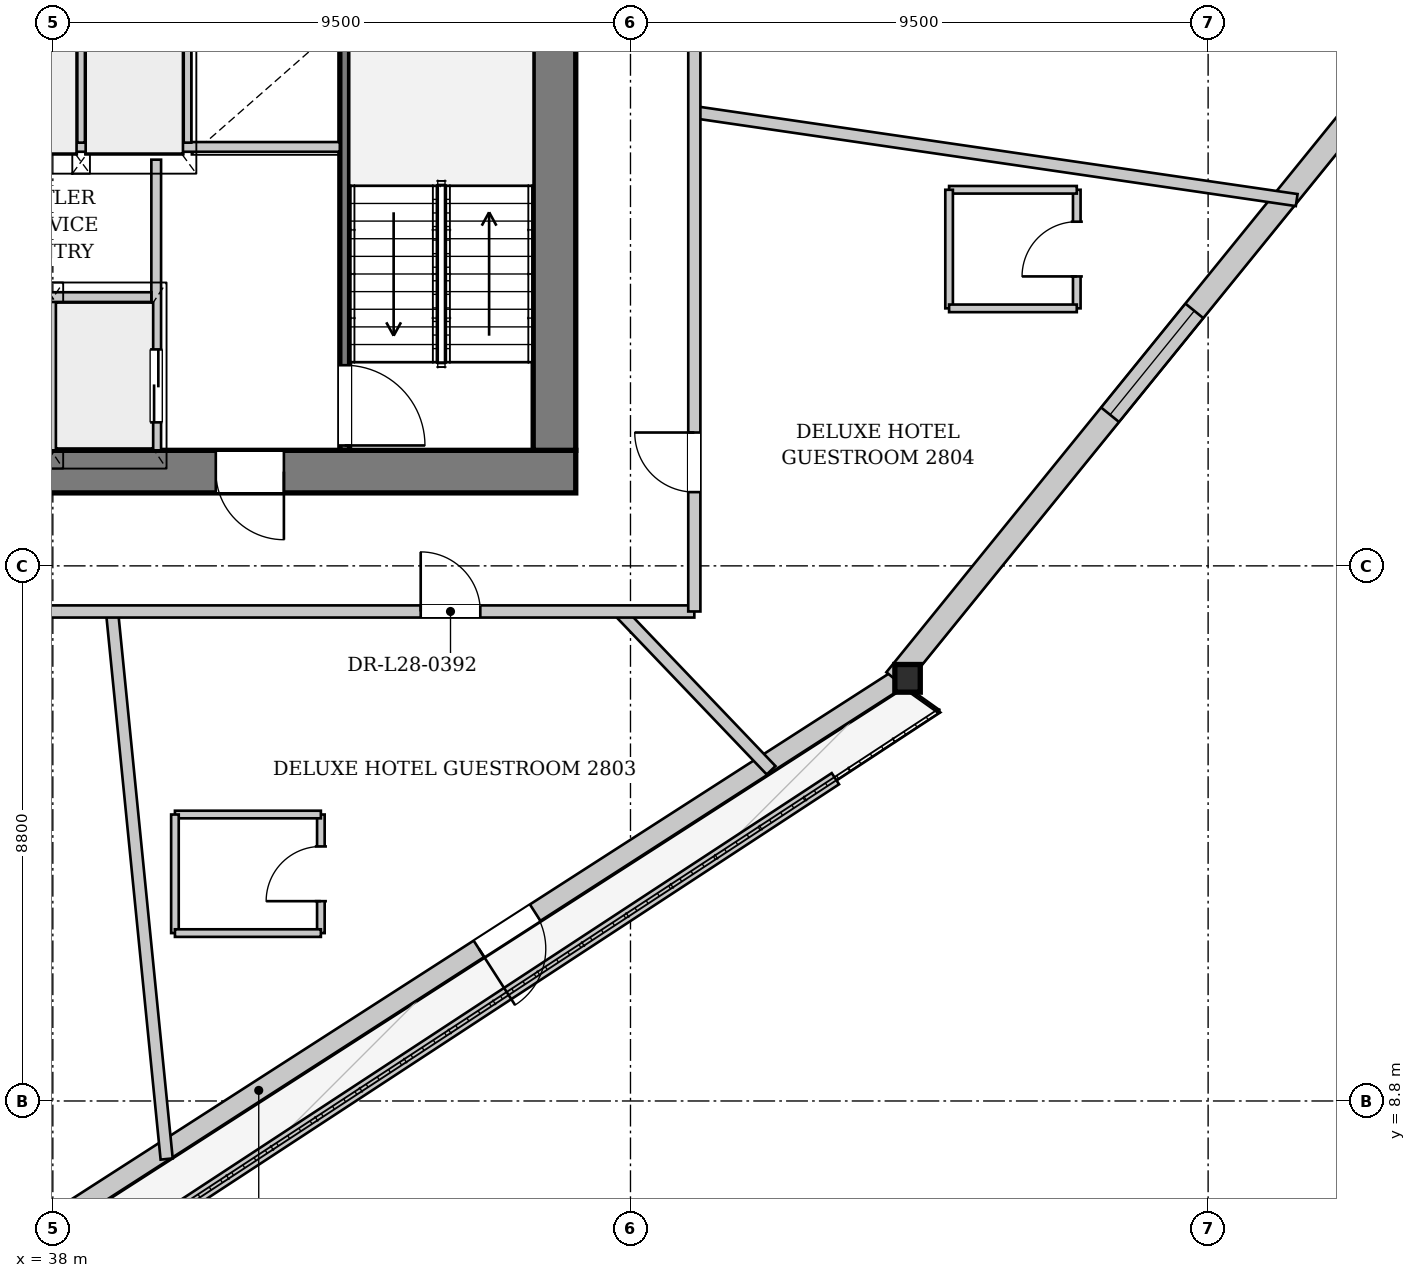
"""IFC4 building model, lengths in metres.
Left out: names, types, materials, properties, quantities, classifications, styles, units other than length and angle.
Written with IfcOpenShell. Run it as: python <this file> out.ifc"""

import sys

from ifc_helpers import new_model, si_unit, direction, frame, frame_2d, origin, origin_2d, place, context, subcontext, project, spatial, rectangle, i_section, extrude, source, transform, mapped, element, fill, save


model = new_model("IFC4")
c1 = context("Model", 3, precision=1e-05, world=origin(), true_north=direction((0.0, 1.0)))
c2 = subcontext(c1, "Body", "Model", "MODEL_VIEW")
j1 = project(units=[si_unit("LENGTHUNIT", "METRE"), si_unit("PLANEANGLEUNIT", "RADIAN")], contexts=[c1])
p1 = place(None, origin())
s1 = spatial("IfcSite", under=j1, at=p1, CompositionType="ELEMENT")
p2 = place(p1, origin())
s2 = spatial("IfcBuilding", under=s1, at=p2, CompositionType="ELEMENT")
p3 = place(p2, frame((0.0, 0.0, 109.25)))
s3 = spatial("IfcBuildingStorey", under=s2, at=p3, CompositionType="ELEMENT", Elevation=109.25)
m1 = source(origin(), c2, "Body", "SweptSolid", [
    extrude(i_section(OverallWidth=0.418, OverallDepth=0.455, WebThickness=0.038, FlangeThickness=0.059, at=origin_2d()), origin(), (0.0, 0.0, 1.0), 3.398),
])
p4 = place(p3, frame((52.003, 15.611, 0.0), z_axis=(0.031540088842, 0.081975492868, 0.996135152158), x_axis=(-0.933303436378, 0.359088701639, 0.0)))
e1 = element("IfcColumn", 1, at=p4, inside=s3, PredefinedType="COLUMN", context=c2, shape_type="MappedRepresentation", body=[
    mapped(m1, transform((0.0, 0.0, 0.0), x_axis=(1.0, 0.0, 0.0), y_axis=(0.0, 1.0, 0.0), z_axis=(0.0, 0.0, 1.0), scale=1.0)),
])
p5 = place(p3, frame((51.917, 15.746, 0.0), z_axis=(0.0, 0.0, 1.0), x_axis=(-0.841105279502, -0.540871434626, 0.0)))
e2 = element("IfcWall", 2, at=p5, inside=s3, PredefinedType="SOLIDWALL", context=c2, shape_type="SweptSolid", body=[
    extrude(rectangle(XDim=23.953, YDim=0.32, at=frame_2d((11.976, 0.0))), origin(), (0.0, 0.0, 1.0), 2.692),
])
p6 = place(p5, frame((7.115, 0.0, 0.0)))
e3 = element("IfcOpeningElement", 3, at=p6, cuts=e2, PredefinedType="OPENING", context=c2, shape_type="SweptSolid", body=[
    extrude(rectangle(XDim=1.1, YDim=2.3, at=frame_2d((0.55, 1.15))), frame((0.0, 0.17, 0.0), z_axis=(0.0, -1.0, 0.0), x_axis=(1.0, 0.0, 0.0)), (0.0, 0.0, 1.0), 0.34),
])
p7 = place(p5, frame((16.825, 0.0, 0.372)))
e4 = element("IfcOpeningElement", 4, at=p7, cuts=e2, PredefinedType="OPENING", context=c2, shape_type="SweptSolid", body=[
    extrude(rectangle(XDim=1.8, YDim=2.2, at=frame_2d((0.9, 1.1))), frame((0.0, 0.17, 0.0), z_axis=(0.0, -1.0, 0.0), x_axis=(1.0, 0.0, 0.0)), (0.0, 0.0, 1.0), 0.34),
])
p8 = place(p3, frame((66.944, 34.334, 0.0), z_axis=(0.0, 0.0, 1.0), x_axis=(-0.629923947576, -0.776656822715, 0.0)))
e5 = element("IfcWall", 5, at=p8, inside=s3, PredefinedType="SOLIDWALL", context=c2, shape_type="SweptSolid", body=[
    extrude(rectangle(XDim=23.953, YDim=0.38, at=frame_2d((11.976, 0.0))), origin(), (0.0, 0.0, 1.0), 2.692),
])
p9 = place(p8, frame((5.607, 0.0, 0.322)))
e6 = element("IfcOpeningElement", 6, at=p9, cuts=e5, PredefinedType="OPENING", context=c2, shape_type="SweptSolid", body=[
    extrude(rectangle(XDim=2.2, YDim=2.25, at=frame_2d((1.1, 1.125))), frame((0.0, 0.2, 0.0), z_axis=(0.0, -1.0, 0.0), x_axis=(1.0, 0.0, 0.0)), (0.0, 0.0, 1.0), 0.4),
])
p10 = place(p8, frame((16.146, 0.0, 0.322)))
e7 = element("IfcOpeningElement", 7, at=p10, cuts=e5, PredefinedType="OPENING", context=c2, shape_type="SweptSolid", body=[
    extrude(rectangle(XDim=2.2, YDim=2.25, at=frame_2d((1.1, 1.125))), frame((0.0, 0.2, 0.0), z_axis=(0.0, -1.0, 0.0), x_axis=(1.0, 0.0, 0.0)), (0.0, 0.0, 1.0), 0.4),
])
p11 = place(p3, frame((33.07, 2.433, 0.0), z_axis=(0.0, 0.0, 1.0), x_axis=(0.836347057306, 0.548200328106, 0.0)))
e8 = element("IfcWall", 8, at=p11, inside=s3, PredefinedType="PARAPET", context=c2, shape_type="SweptSolid", body=[
    extrude(rectangle(XDim=21.283, YDim=0.22, at=frame_2d((10.641, 0.0))), origin(), (0.0, 0.0, 1.0), 0.3),
])
p12 = place(p3, frame((46.6, 19.15, 0.0), z_axis=(0.0, 0.0, 1.0), x_axis=(-1.0, 0.0, 0.0)))
e9 = element("IfcWall", 9, at=p12, inside=s3, PredefinedType="SHEAR", context=c2, shape_type="SweptSolid", body=[
    extrude(rectangle(XDim=17.2, YDim=0.7, at=frame_2d((8.6, 0.0))), origin(), (0.0, 0.0, 1.0), 3.3),
])
p13 = place(p12, frame((4.8, 0.0, 0.0)))
e10 = element("IfcOpeningElement", 10, at=p13, cuts=e9, PredefinedType="OPENING", context=c2, shape_type="SweptSolid", body=[
    extrude(rectangle(XDim=1.12, YDim=2.25, at=frame_2d((0.56, 1.125))), frame((0.0, 0.36, 0.0), z_axis=(0.0, -1.0, 0.0), x_axis=(1.0, 0.0, 0.0)), (0.0, 0.0, 1.0), 0.72),
])
p14 = place(p12, frame((11.3, 0.0, 0.0)))
e11 = element("IfcOpeningElement", 11, at=p14, cuts=e9, PredefinedType="OPENING", context=c2, shape_type="SweptSolid", body=[
    extrude(rectangle(XDim=1.12, YDim=2.25, at=frame_2d((0.56, 1.125))), frame((0.0, 0.36, 0.0), z_axis=(0.0, -1.0, 0.0), x_axis=(1.0, 0.0, 0.0)), (0.0, 0.0, 1.0), 0.72),
])
p15 = place(p3, frame((46.25, 33.7, 0.0), z_axis=(0.0, 0.0, 1.0), x_axis=(0.0, -1.0, 0.0)))
e12 = element("IfcWall", 12, at=p15, inside=s3, PredefinedType="SHEAR", context=c2, shape_type="SweptSolid", body=[
    extrude(rectangle(XDim=14.2, YDim=0.7, at=frame_2d((7.1, 0.0))), origin(), (0.0, 0.0, 1.0), 3.3),
])
p16 = place(p15, frame((5.18, 0.0, 0.0)))
e13 = element("IfcOpeningElement", 13, at=p16, cuts=e12, PredefinedType="OPENING", context=c2, shape_type="SweptSolid", body=[
    extrude(rectangle(XDim=1.6, YDim=2.2, at=frame_2d((0.8, 1.1))), frame((0.0, 0.36, 0.0), z_axis=(0.0, -1.0, 0.0), x_axis=(1.0, 0.0, 0.0)), (0.0, 0.0, 1.0), 0.72),
])
p17 = place(p3, frame((42.8, 26.96, 0.0), z_axis=(0.0, 0.0, 1.0), x_axis=(0.0, -1.0, 0.0)))
e14 = element("IfcWall", 14, at=p17, inside=s3, PredefinedType="PARTITIONING", context=c2, shape_type="SweptSolid", body=[
    extrude(rectangle(XDim=7.46, YDim=0.16, at=frame_2d((3.73, 0.0))), origin(), (0.0, 0.0, 1.0), 3.3),
])
p18 = place(p17, frame((6.06, 0.0, 0.0)))
e15 = element("IfcOpeningElement", 15, at=p18, cuts=e14, PredefinedType="OPENING", context=c2, shape_type="SweptSolid", body=[
    extrude(rectangle(XDim=1.32, YDim=2.2, at=frame_2d((0.66, 1.1))), frame((0.0, 0.09, 0.0), z_axis=(0.0, -1.0, 0.0), x_axis=(1.0, 0.0, 0.0)), (0.0, 0.0, 1.0), 0.18),
])
p19 = place(p3, frame((39.7, 24.28, 0.0), z_axis=(0.0, 0.0, 1.0), x_axis=(0.0, -1.0, 0.0)))
e16 = element("IfcWall", 16, at=p19, inside=s3, PredefinedType="PARTITIONING", context=c2, shape_type="SweptSolid", body=[
    extrude(rectangle(XDim=4.78, YDim=0.16, at=frame_2d((2.39, 0.0))), origin(), (0.0, 0.0, 1.0), 3.3),
])
p20 = place(p19, frame((3.12, 0.0, 0.0)))
e17 = element("IfcOpeningElement", 17, at=p20, cuts=e16, PredefinedType="OPENING", context=c2, shape_type="SweptSolid", body=[
    extrude(rectangle(XDim=1.2, YDim=2.2, at=frame_2d((0.6, 1.1))), frame((0.0, 0.09, 0.0), z_axis=(0.0, -1.0, 0.0), x_axis=(1.0, 0.0, 0.0)), (0.0, 0.0, 1.0), 0.18),
])
p21 = place(p3, frame((38.0, 19.5, 0.0), z_axis=(0.0, 0.0, 1.0), x_axis=(0.0, 1.0, 0.0)))
e18 = element("IfcWall", 18, at=p21, inside=s3, PredefinedType="PARTITIONING", context=c2, shape_type="SweptSolid", body=[
    extrude(rectangle(XDim=2.46, YDim=0.125, at=frame_2d((1.23, 0.0))), origin(), (0.0, 0.0, 1.0), 3.3),
])
p22 = place(p3, frame((36.38, 22.02, 0.0), z_axis=(0.0, 0.0, 1.0), x_axis=(1.0, 0.0, 0.0)))
e19 = element("IfcWall", 19, at=p22, inside=s3, PredefinedType="PARTITIONING", context=c2, shape_type="SweptSolid", body=[
    extrude(rectangle(XDim=3.24, YDim=0.16, at=frame_2d((1.62, 0.0))), origin(), (0.0, 0.0, 1.0), 3.3),
])
p23 = place(p3, frame((33.28, 24.49, 0.0), z_axis=(0.0, 0.0, 1.0), x_axis=(1.0, 0.0, 0.0)))
e20 = element("IfcWall", 20, at=p23, inside=s3, PredefinedType="PARTITIONING", context=c2, shape_type="SweptSolid", body=[
    extrude(rectangle(XDim=9.44, YDim=0.16, at=frame_2d((4.72, 0.0))), origin(), (0.0, 0.0, 1.0), 3.3),
])
for number, where, z_axis, x_axis in (
    (21, (38.465, 24.56, 0.0), (0.0, 0.0, 1.0), (0.0, 1.0, 0.0)),
    (22, (40.215, 24.56, 0.0), (0.0, 0.0, 1.0), (0.0, 1.0, 0.0)),
):
    element("IfcWall", number, at=place(p3, frame(where, z_axis=z_axis, x_axis=x_axis)), inside=s3, PredefinedType="PARTITIONING", context=c2, shape_type="SweptSolid", body=[
        extrude(rectangle(XDim=2.31, YDim=0.125, at=frame_2d((1.155, 0.0))), origin(), (0.0, 0.0, 1.0), 3.3),
    ])
p24 = place(p3, frame((38.973, 16.85, 0.0), z_axis=(0.0, 0.0, 1.0), x_axis=(0.099311388346, -0.995056404504, 0.0)))
e23 = element("IfcWall", 23, at=p24, inside=s3, PredefinedType="PARTITIONING", context=c2, shape_type="SweptSolid", body=[
    extrude(rectangle(XDim=9.049, YDim=0.2, at=frame_2d((4.524, 0.0))), origin(), (0.0, 0.0, 1.0), 3.3),
])
p25 = place(p3, frame((47.317, 16.85, 0.0), z_axis=(0.0, 0.0, 1.0), x_axis=(0.690838930263, -0.723008694576, 0.0)))
e24 = element("IfcWall", 24, at=p25, inside=s3, PredefinedType="PARTITIONING", context=c2, shape_type="SweptSolid", body=[
    extrude(rectangle(XDim=3.613, YDim=0.2, at=frame_2d((1.806, 0.0))), origin(), (0.0, 0.0, 1.0), 3.3),
])
p26 = place(p3, frame((48.55, 25.061, 0.0), z_axis=(0.0, 0.0, 1.0), x_axis=(0.989528192481, -0.144339725252, 0.0)))
e25 = element("IfcWall", 25, at=p26, inside=s3, PredefinedType="PARTITIONING", context=c2, shape_type="SweptSolid", body=[
    extrude(rectangle(XDim=10.011, YDim=0.2, at=frame_2d((5.006, 0.0))), origin(), (0.0, 0.0, 1.0), 3.3),
])
p27 = place(p3, frame((42.408, 11.561, 0.0), z_axis=(0.0, 0.0, 1.0), x_axis=(0.0, 1.0, 0.0)))
e26 = element("IfcWall", 26, at=p27, inside=s3, PredefinedType="PARTITIONING", context=c2, shape_type="SweptSolid", body=[
    extrude(rectangle(XDim=1.95, YDim=0.125, at=frame_2d((0.975, 0.0))), origin(), (0.0, 0.0, 1.0), 3.3),
])
p28 = place(p27, frame((0.525, 0.0, 0.0)))
e27 = element("IfcOpeningElement", 27, at=p28, cuts=e26, PredefinedType="OPENING", context=c2, shape_type="SweptSolid", body=[
    extrude(rectangle(XDim=0.9, YDim=2.1, at=frame_2d((0.45, 1.05))), frame((0.0, 0.073, 0.0), z_axis=(0.0, -1.0, 0.0), x_axis=(1.0, 0.0, 0.0)), (0.0, 0.0, 1.0), 0.145),
])
p29 = place(p3, frame((42.408, 13.511, 0.0), z_axis=(0.0, 0.0, 1.0), x_axis=(-1.0, 0.0, 0.0)))
e28 = element("IfcWall", 28, at=p29, inside=s3, PredefinedType="PARTITIONING", context=c2, shape_type="SweptSolid", body=[
    extrude(rectangle(XDim=2.4, YDim=0.125, at=frame_2d((1.2, 0.0))), origin(), (0.0, 0.0, 1.0), 2.925),
])
p30 = place(p3, frame((40.008, 13.511, 0.0), z_axis=(0.0, 0.0, 1.0), x_axis=(0.0, -1.0, 0.0)))
e29 = element("IfcWall", 29, at=p30, inside=s3, PredefinedType="PARTITIONING", context=c2, shape_type="SweptSolid", body=[
    extrude(rectangle(XDim=1.95, YDim=0.125, at=frame_2d((0.975, 0.0))), origin(), (0.0, 0.0, 1.0), 3.3),
])
p31 = place(p3, frame((40.008, 11.561, 0.0), z_axis=(0.0, 0.0, 1.0), x_axis=(1.0, 0.0, 0.0)))
e30 = element("IfcWall", 30, at=p31, inside=s3, PredefinedType="PARTITIONING", context=c2, shape_type="SweptSolid", body=[
    extrude(rectangle(XDim=2.4, YDim=0.125, at=frame_2d((1.2, 0.0))), origin(), (0.0, 0.0, 1.0), 3.3),
])
p32 = place(p3, frame((54.84, 21.835, 0.0), z_axis=(0.0, 0.0, 1.0), x_axis=(0.0, 1.0, 0.0)))
e31 = element("IfcWall", 31, at=p32, inside=s3, PredefinedType="PARTITIONING", context=c2, shape_type="SweptSolid", body=[
    extrude(rectangle(XDim=1.95, YDim=0.125, at=frame_2d((0.975, 0.0))), origin(), (0.0, 0.0, 1.0), 3.3),
])
p33 = place(p32, frame((0.525, 0.0, 0.0)))
e32 = element("IfcOpeningElement", 32, at=p33, cuts=e31, PredefinedType="OPENING", context=c2, shape_type="SweptSolid", body=[
    extrude(rectangle(XDim=0.9, YDim=2.1, at=frame_2d((0.45, 1.05))), frame((0.0, 0.073, 0.0), z_axis=(0.0, -1.0, 0.0), x_axis=(1.0, 0.0, 0.0)), (0.0, 0.0, 1.0), 0.145),
])
p34 = place(p3, frame((54.84, 23.785, 0.0), z_axis=(0.0, 0.0, 1.0), x_axis=(-1.0, 0.0, 0.0)))
e33 = element("IfcWall", 33, at=p34, inside=s3, PredefinedType="PARTITIONING", context=c2, shape_type="SweptSolid", body=[
    extrude(rectangle(XDim=2.1, YDim=0.125, at=frame_2d((1.05, 0.0))), origin(), (0.0, 0.0, 1.0), 3.3),
])
p35 = place(p3, frame((52.74, 23.785, 0.0), z_axis=(0.0, 0.0, 1.0), x_axis=(0.0, -1.0, 0.0)))
e34 = element("IfcWall", 34, at=p35, inside=s3, PredefinedType="PARTITIONING", context=c2, shape_type="SweptSolid", body=[
    extrude(rectangle(XDim=1.95, YDim=0.125, at=frame_2d((0.975, 0.0))), origin(), (0.0, 0.0, 1.0), 3.3),
])
p36 = place(p3, frame((52.74, 21.835, 0.0), z_axis=(0.0, 0.0, 1.0), x_axis=(1.0, 0.0, 0.0)))
e35 = element("IfcWall", 35, at=p36, inside=s3, PredefinedType="PARTITIONING", context=c2, shape_type="SweptSolid", body=[
    extrude(rectangle(XDim=2.1, YDim=0.125, at=frame_2d((1.05, 0.0))), origin(), (0.0, 0.0, 1.0), 3.3),
])
p37 = place(p3, frame((27.45, 16.85, 0.0), z_axis=(0.0, 0.0, 1.0), x_axis=(1.0, 0.0, 0.0)))
e36 = element("IfcWall", 36, at=p37, inside=s3, PredefinedType="PARTITIONING", context=c2, shape_type="SweptSolid", body=[
    extrude(rectangle(XDim=21.1, YDim=0.2, at=frame_2d((10.55, 0.0))), origin(), (0.0, 0.0, 1.0), 2.925),
])
p38 = place(p37, frame((6.839, 0.0, 0.0)))
e37 = element("IfcOpeningElement", 37, at=p38, cuts=e36, PredefinedType="OPENING", context=c2, shape_type="SweptSolid", body=[
    extrude(rectangle(XDim=0.98, YDim=2.15, at=frame_2d((0.49, 1.075))), frame((0.0, 0.11, 0.0), z_axis=(0.0, -1.0, 0.0), x_axis=(1.0, 0.0, 0.0)), (0.0, 0.0, 1.0), 0.22),
])
p39 = place(p37, frame((16.6, 0.0, 0.0)))
e38 = element("IfcOpeningElement", 38, at=p39, cuts=e36, PredefinedType="OPENING", context=c2, shape_type="SweptSolid", body=[
    extrude(rectangle(XDim=0.98, YDim=2.15, at=frame_2d((0.49, 1.075))), frame((0.0, 0.11, 0.0), z_axis=(0.0, -1.0, 0.0), x_axis=(1.0, 0.0, 0.0)), (0.0, 0.0, 1.0), 0.22),
])
p40 = place(p3, frame((48.55, 16.85, 0.0), z_axis=(0.0, 0.0, 1.0), x_axis=(0.0, 1.0, 0.0)))
e39 = element("IfcWall", 39, at=p40, inside=s3, PredefinedType="PARTITIONING", context=c2, shape_type="SweptSolid", body=[
    extrude(rectangle(XDim=19.5, YDim=0.2, at=frame_2d((9.75, 0.0))), origin(), (0.0, 0.0, 1.0), 3.3),
])
p41 = place(p40, frame((1.963, 0.0, 0.0)))
e40 = element("IfcOpeningElement", 40, at=p41, cuts=e39, PredefinedType="OPENING", context=c2, shape_type="SweptSolid", body=[
    extrude(rectangle(XDim=0.98, YDim=2.15, at=frame_2d((0.49, 1.075))), frame((0.0, 0.11, 0.0), z_axis=(0.0, -1.0, 0.0), x_axis=(1.0, 0.0, 0.0)), (0.0, 0.0, 1.0), 0.22),
])
p42 = place(p40, frame((11.52, 0.0, 0.0)))
e41 = element("IfcOpeningElement", 41, at=p42, cuts=e39, PredefinedType="OPENING", context=c2, shape_type="SweptSolid", body=[
    extrude(rectangle(XDim=0.98, YDim=2.15, at=frame_2d((0.49, 1.075))), frame((0.0, 0.11, 0.0), z_axis=(0.0, -1.0, 0.0), x_axis=(1.0, 0.0, 0.0)), (0.0, 0.0, 1.0), 0.22),
])
m2 = source(origin(), c2, "Body", "SweptSolid", [
    extrude(rectangle(XDim=1.1, YDim=2.3, at=frame_2d((0.55, 1.15))), frame((0.0, 0.025, 0.0), z_axis=(0.0, -1.0, 0.0), x_axis=(1.0, 0.0, 0.0)), (0.0, 0.0, 1.0), 0.05),
])
p43 = place(p6, origin())
e42 = element("IfcDoor", 42, at=p43, inside=s3, OperationType="SINGLE_SWING_RIGHT", PredefinedType="DOOR", context=c2, shape_type="MappedRepresentation", body=[
    mapped(m2, transform((0.0, 0.0, 0.0), x_axis=(1.0, 0.0, 0.0), y_axis=(0.0, 1.0, 0.0), z_axis=(0.0, 0.0, 1.0), scale=1.0)),
])
fill(e3, e42)
m3 = source(origin(), c2, "Body", "SweptSolid", [
    extrude(rectangle(XDim=2.2, YDim=2.25, at=frame_2d((1.1, 1.125))), frame((0.0, 0.03, 0.0), z_axis=(0.0, -1.0, 0.0), x_axis=(1.0, 0.0, 0.0)), (0.0, 0.0, 1.0), 0.06),
])
p44 = place(p10, origin())
e43 = element("IfcWindow", 43, at=p44, inside=s3, PartitioningType="SINGLE_PANEL", PredefinedType="WINDOW", context=c2, shape_type="MappedRepresentation", body=[
    mapped(m3, transform((0.0, 0.0, 0.0), x_axis=(1.0, 0.0, 0.0), y_axis=(0.0, 1.0, 0.0), z_axis=(0.0, 0.0, 1.0), scale=1.0)),
])
fill(e7, e43)
m4 = source(origin(), c2, "Body", "SweptSolid", [
    extrude(rectangle(XDim=1.12, YDim=2.25, at=frame_2d((0.56, 1.125))), frame((0.0, 0.025, 0.0), z_axis=(0.0, -1.0, 0.0), x_axis=(1.0, 0.0, 0.0)), (0.0, 0.0, 1.0), 0.05),
])
p45 = place(p13, origin())
e44 = element("IfcDoor", 44, at=p45, inside=s3, OperationType="SINGLE_SWING_LEFT", PredefinedType="DOOR", context=c2, shape_type="MappedRepresentation", body=[
    mapped(m4, transform((0.0, 0.0, 0.0), x_axis=(1.0, 0.0, 0.0), y_axis=(0.0, 1.0, 0.0), z_axis=(0.0, 0.0, 1.0), scale=1.0)),
])
fill(e10, e44)
m5 = source(origin(), c2, "Body", "SweptSolid", [
    extrude(rectangle(XDim=1.32, YDim=2.2, at=frame_2d((0.66, 1.1))), frame((0.0, 0.025, 0.0), z_axis=(0.0, -1.0, 0.0), x_axis=(1.0, 0.0, 0.0)), (0.0, 0.0, 1.0), 0.05),
])
p46 = place(p18, origin())
e45 = element("IfcDoor", 45, at=p46, inside=s3, OperationType="SINGLE_SWING_RIGHT", PredefinedType="DOOR", context=c2, shape_type="MappedRepresentation", body=[
    mapped(m5, transform((0.0, 0.0, 0.0), x_axis=(1.0, 0.0, 0.0), y_axis=(0.0, 1.0, 0.0), z_axis=(0.0, 0.0, 1.0), scale=1.0)),
])
fill(e15, e45)
m6 = source(origin(), c2, "Body", "SweptSolid", [
    extrude(rectangle(XDim=1.2, YDim=2.2, at=frame_2d((0.6, 1.1))), frame((0.0, 0.025, 0.0), z_axis=(0.0, -1.0, 0.0), x_axis=(1.0, 0.0, 0.0)), (0.0, 0.0, 1.0), 0.05),
])
p47 = place(p20, origin())
e46 = element("IfcDoor", 46, at=p47, inside=s3, OperationType="DOUBLE_DOOR_SLIDING", PredefinedType="DOOR", context=c2, shape_type="MappedRepresentation", body=[
    mapped(m6, transform((0.0, 0.0, 0.0), x_axis=(1.0, 0.0, 0.0), y_axis=(0.0, 1.0, 0.0), z_axis=(0.0, 0.0, 1.0), scale=1.0)),
])
fill(e17, e46)
m7 = source(origin(), c2, "Body", "SweptSolid", [
    extrude(rectangle(XDim=0.9, YDim=2.1, at=frame_2d((0.45, 1.05))), frame((0.0, 0.025, 0.0), z_axis=(0.0, -1.0, 0.0), x_axis=(1.0, 0.0, 0.0)), (0.0, 0.0, 1.0), 0.05),
])
p48 = place(p28, origin())
e47 = element("IfcDoor", 47, at=p48, inside=s3, OperationType="SINGLE_SWING_LEFT", PredefinedType="DOOR", context=c2, shape_type="MappedRepresentation", body=[
    mapped(m7, transform((0.0, 0.0, 0.0), x_axis=(1.0, 0.0, 0.0), y_axis=(0.0, 1.0, 0.0), z_axis=(0.0, 0.0, 1.0), scale=1.0)),
])
fill(e27, e47)
p49 = place(p33, origin())
e48 = element("IfcDoor", 48, at=p49, inside=s3, OperationType="SINGLE_SWING_LEFT", PredefinedType="DOOR", context=c2, shape_type="MappedRepresentation", body=[
    mapped(m7, transform((0.0, 0.0, 0.0), x_axis=(1.0, 0.0, 0.0), y_axis=(0.0, 1.0, 0.0), z_axis=(0.0, 0.0, 1.0), scale=1.0)),
])
fill(e32, e48)
m8 = source(origin(), c2, "Body", "SweptSolid", [
    extrude(rectangle(XDim=0.98, YDim=2.15, at=frame_2d((0.49, 1.075))), frame((0.0, 0.025, 0.0), z_axis=(0.0, -1.0, 0.0), x_axis=(1.0, 0.0, 0.0)), (0.0, 0.0, 1.0), 0.05),
])
p50 = place(p39, origin())
e49 = element("IfcDoor", 49, at=p50, inside=s3, OperationType="SINGLE_SWING_LEFT", PredefinedType="DOOR", context=c2, shape_type="MappedRepresentation", body=[
    mapped(m8, transform((0.0, 0.0, 0.0), x_axis=(1.0, 0.0, 0.0), y_axis=(0.0, 1.0, 0.0), z_axis=(0.0, 0.0, 1.0), scale=1.0)),
])
fill(e38, e49)
p51 = place(p41, origin())
e50 = element("IfcDoor", 50, at=p51, inside=s3, OperationType="SINGLE_SWING_RIGHT", PredefinedType="DOOR", context=c2, shape_type="MappedRepresentation", body=[
    mapped(m8, transform((0.0, 0.0, 0.0), x_axis=(1.0, 0.0, 0.0), y_axis=(0.0, 1.0, 0.0), z_axis=(0.0, 0.0, 1.0), scale=1.0)),
])
fill(e40, e50)
save(model, sys.argv[1])
